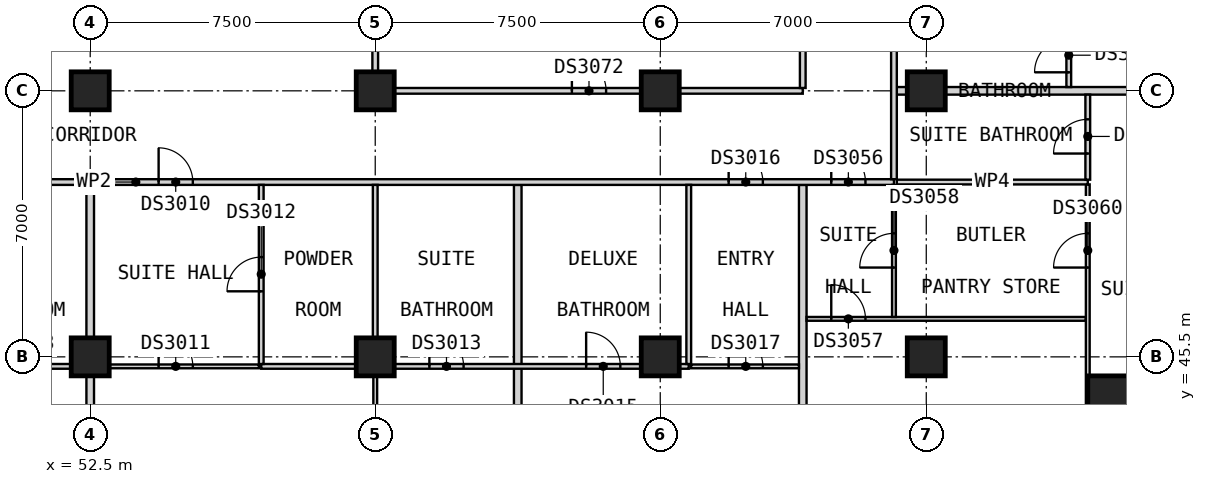
"""IFC4 building model, lengths in metres.
Left out: names, types, materials, properties, quantities, classifications, styles, units other than length and angle.
Written with IfcOpenShell. Run it as: python <this file> out.ifc"""

import sys

from ifc_helpers import new_model, si_unit, direction, frame, frame_2d, origin, origin_2d, place, context, subcontext, project, spatial, rectangle, extrude, element, fill, save


model = new_model("IFC4")
c1 = context("Model", 3, precision=1e-05, world=origin(), true_north=direction((0.0, 1.0)))
c2 = subcontext(c1, "Body", "Model", "MODEL_VIEW")
j1 = project(units=[si_unit("LENGTHUNIT", "METRE"), si_unit("PLANEANGLEUNIT", "RADIAN")], contexts=[c1])
p1 = place(None, origin())
s1 = spatial("IfcSite", under=j1, at=p1, CompositionType="ELEMENT")
p2 = place(p1, origin())
s2 = spatial("IfcBuilding", under=s1, at=p2, CompositionType="ELEMENT")
p3 = place(p2, frame((0.0, 0.0, 137.4)))
s3 = spatial("IfcBuildingStorey", under=s2, at=p3, CompositionType="ELEMENT", Elevation=137.4)
for number, where, z_axis, x_axis in (
    (1, (52.5, 45.5, 0.0), (0.0, 0.0, 1.0), (1.0, 0.0, 0.0)),
    (2, (52.5, 52.5, 0.0), (0.0, 0.0, 1.0), (1.0, 0.0, 0.0)),
    (3, (60.0, 45.5, 0.0), (0.0, 0.0, 1.0), (1.0, 0.0, 0.0)),
    (4, (60.0, 52.5, 0.0), (0.0, 0.0, 1.0), (1.0, 0.0, 0.0)),
    (5, (67.5, 45.5, 0.0), (0.0, 0.0, 1.0), (1.0, 0.0, 0.0)),
    (6, (67.5, 52.5, 0.0), (0.0, 0.0, 1.0), (1.0, 0.0, 0.0)),
    (7, (74.5, 45.5, 0.0), (0.0, 0.0, 1.0), (1.0, 0.0, 0.0)),
    (8, (74.5, 52.5, 0.0), (0.0, 0.0, 1.0), (1.0, 0.0, 0.0)),
):
    element("IfcColumn", number, at=place(p3, frame(where, z_axis=z_axis, x_axis=x_axis)), inside=s3, PredefinedType="COLUMN", context=c2, shape_type="SweptSolid", body=[
        extrude(rectangle(XDim=1.0, YDim=1.0, at=origin_2d()), origin(), (0.0, 0.0, 1.0), 3.6),
    ])
p4 = place(p3, frame((80.5, 43.25, 0.0), z_axis=(0.0, 0.0, 1.0), x_axis=(1.0, 0.0, 0.0)))
e9 = element("IfcColumn", 9, at=p4, inside=s3, PredefinedType="COLUMN", context=c2, shape_type="SweptSolid", body=[
    extrude(rectangle(XDim=3.5, YDim=3.5, at=origin_2d()), origin(), (0.0, 0.0, 1.0), 3.6),
])
for number, where, z_axis, x_axis in (
    (10, (73.725, 52.5, 0.0), (0.0, 0.0, 1.0), (1.0, 0.0, 0.0)),
    (11, (52.5, 37.5, 0.0), (0.0, 0.0, 1.0), (0.0, 1.0, 0.0)),
):
    element("IfcWall", number, at=place(p3, frame(where, z_axis=z_axis, x_axis=x_axis)), inside=s3, PredefinedType="PARTITIONING", context=c2, shape_type="SweptSolid", body=[
        extrude(rectangle(XDim=12.525, YDim=0.2, at=frame_2d((6.262, 0.0))), origin(), (0.0, 0.0, 1.0), 3.35),
    ])
for number, where, z_axis, x_axis in (
    (12, (63.75, 38.31, 0.0), (0.0, 0.0, 1.0), (0.0, 1.0, 0.0)),
    (13, (71.25, 38.31, 0.0), (0.0, 0.0, 1.0), (0.0, 1.0, 0.0)),
):
    element("IfcWall", number, at=place(p3, frame(where, z_axis=z_axis, x_axis=x_axis)), inside=s3, PredefinedType="PARTITIONING", context=c2, shape_type="SweptSolid", body=[
        extrude(rectangle(XDim=11.715, YDim=0.2, at=frame_2d((5.857, 0.0))), origin(), (0.0, 0.0, 1.0), 3.35),
    ])
p5 = place(p3, frame((33.75, 50.1, 0.0), z_axis=(0.0, 0.0, 1.0), x_axis=(1.0, 0.0, 0.0)))
e14 = element("IfcWall", 14, at=p5, inside=s3, PredefinedType="PARTITIONING", context=c2, shape_type="SweptSolid", body=[
    extrude(rectangle(XDim=39.9, YDim=0.15, at=frame_2d((19.95, 0.0))), origin(), (0.0, 0.0, 1.0), 3.35),
])
p6 = place(p5, frame((5.175, 0.0, 0.0)))
e15 = element("IfcOpeningElement", 15, at=p6, cuts=e14, PredefinedType="OPENING", context=c2, shape_type="SweptSolid", body=[
    extrude(rectangle(XDim=0.9, YDim=2.1, at=frame_2d((0.45, 1.05))), frame((0.0, 0.085, 0.0), z_axis=(0.0, -1.0, 0.0), x_axis=(1.0, 0.0, 0.0)), (0.0, 0.0, 1.0), 0.17),
])
p7 = place(p5, frame((9.3, 0.0, 0.0)))
e16 = element("IfcOpeningElement", 16, at=p7, cuts=e14, PredefinedType="OPENING", context=c2, shape_type="SweptSolid", body=[
    extrude(rectangle(XDim=0.9, YDim=2.1, at=frame_2d((0.45, 1.05))), frame((0.0, 0.085, 0.0), z_axis=(0.0, -1.0, 0.0), x_axis=(1.0, 0.0, 0.0)), (0.0, 0.0, 1.0), 0.17),
])
p8 = place(p5, frame((20.55, 0.0, 0.0)))
e17 = element("IfcOpeningElement", 17, at=p8, cuts=e14, PredefinedType="OPENING", context=c2, shape_type="SweptSolid", body=[
    extrude(rectangle(XDim=0.9, YDim=2.1, at=frame_2d((0.45, 1.05))), frame((0.0, 0.085, 0.0), z_axis=(0.0, -1.0, 0.0), x_axis=(1.0, 0.0, 0.0)), (0.0, 0.0, 1.0), 0.17),
])
p9 = place(p5, frame((35.55, 0.0, 0.0)))
e18 = element("IfcOpeningElement", 18, at=p9, cuts=e14, PredefinedType="OPENING", context=c2, shape_type="SweptSolid", body=[
    extrude(rectangle(XDim=0.9, YDim=2.1, at=frame_2d((0.45, 1.05))), frame((0.0, 0.085, 0.0), z_axis=(0.0, -1.0, 0.0), x_axis=(1.0, 0.0, 0.0)), (0.0, 0.0, 1.0), 0.17),
])
p10 = place(p5, frame((38.25, 0.0, 0.0)))
e19 = element("IfcOpeningElement", 19, at=p10, cuts=e14, PredefinedType="OPENING", context=c2, shape_type="SweptSolid", body=[
    extrude(rectangle(XDim=0.9, YDim=2.1, at=frame_2d((0.45, 1.05))), frame((0.0, 0.085, 0.0), z_axis=(0.0, -1.0, 0.0), x_axis=(1.0, 0.0, 0.0)), (0.0, 0.0, 1.0), 0.17),
])
p11 = place(p3, frame((60.0, 52.5, 0.0), z_axis=(0.0, 0.0, 1.0), x_axis=(1.0, 0.0, 0.0)))
e20 = element("IfcWall", 20, at=p11, inside=s3, PredefinedType="PARTITIONING", context=c2, shape_type="SweptSolid", body=[
    extrude(rectangle(XDim=11.25, YDim=0.15, at=frame_2d((5.625, 0.0))), origin(), (0.0, 0.0, 1.0), 3.35),
])
p12 = place(p11, frame((5.175, 0.0, 0.0)))
e21 = element("IfcOpeningElement", 21, at=p12, cuts=e20, PredefinedType="OPENING", context=c2, shape_type="SweptSolid", body=[
    extrude(rectangle(XDim=0.9, YDim=2.1, at=frame_2d((0.45, 1.05))), frame((0.0, 0.085, 0.0), z_axis=(0.0, -1.0, 0.0), x_axis=(1.0, 0.0, 0.0)), (0.0, 0.0, 1.0), 0.17),
])
p13 = place(p3, frame((71.25, 52.575, 0.0), z_axis=(0.0, 0.0, 1.0), x_axis=(0.0, 1.0, 0.0)))
e22 = element("IfcWall", 22, at=p13, inside=s3, PredefinedType="PARTITIONING", context=c2, shape_type="SweptSolid", body=[
    extrude(rectangle(XDim=11.85, YDim=0.15, at=frame_2d((5.925, 0.0))), origin(), (0.0, 0.0, 1.0), 3.35),
])
p14 = place(p13, frame((9.225, 0.0, 0.0)))
e23 = element("IfcOpeningElement", 23, at=p14, cuts=e22, PredefinedType="OPENING", context=c2, shape_type="SweptSolid", body=[
    extrude(rectangle(XDim=0.9, YDim=2.1, at=frame_2d((0.45, 1.05))), frame((0.0, 0.085, 0.0), z_axis=(0.0, -1.0, 0.0), x_axis=(1.0, 0.0, 0.0)), (0.0, 0.0, 1.0), 0.17),
])
p15 = place(p3, frame((73.65, 50.175, 0.0), z_axis=(0.0, 0.0, 1.0), x_axis=(0.0, 1.0, 0.0)))
e24 = element("IfcWall", 24, at=p15, inside=s3, PredefinedType="PARTITIONING", context=c2, shape_type="SweptSolid", body=[
    extrude(rectangle(XDim=38.4, YDim=0.15, at=frame_2d((19.2, 0.0))), origin(), (0.0, 0.0, 1.0), 3.35),
])
p16 = place(p15, frame((4.688, 0.0, 0.0)))
e25 = element("IfcOpeningElement", 25, at=p16, cuts=e24, PredefinedType="OPENING", context=c2, shape_type="SweptSolid", body=[
    extrude(rectangle(XDim=0.9, YDim=2.1, at=frame_2d((0.45, 1.05))), frame((0.0, 0.085, 0.0), z_axis=(0.0, -1.0, 0.0), x_axis=(1.0, 0.0, 0.0)), (0.0, 0.0, 1.0), 0.17),
])
p17 = place(p15, frame((11.625, 0.0, 0.0)))
e26 = element("IfcOpeningElement", 26, at=p17, cuts=e24, PredefinedType="OPENING", context=c2, shape_type="SweptSolid", body=[
    extrude(rectangle(XDim=0.9, YDim=2.1, at=frame_2d((0.45, 1.05))), frame((0.0, 0.085, 0.0), z_axis=(0.0, -1.0, 0.0), x_axis=(1.0, 0.0, 0.0)), (0.0, 0.0, 1.0), 0.17),
])
p18 = place(p15, frame((22.875, 0.0, 0.0)))
e27 = element("IfcOpeningElement", 27, at=p18, cuts=e24, PredefinedType="OPENING", context=c2, shape_type="SweptSolid", body=[
    extrude(rectangle(XDim=0.9, YDim=2.1, at=frame_2d((0.45, 1.05))), frame((0.0, 0.085, 0.0), z_axis=(0.0, -1.0, 0.0), x_axis=(1.0, 0.0, 0.0)), (0.0, 0.0, 1.0), 0.17),
])
p19 = place(p15, frame((34.688, 0.0, 0.0)))
e28 = element("IfcOpeningElement", 28, at=p19, cuts=e24, PredefinedType="OPENING", context=c2, shape_type="SweptSolid", body=[
    extrude(rectangle(XDim=0.9, YDim=2.1, at=frame_2d((0.45, 1.05))), frame((0.0, 0.085, 0.0), z_axis=(0.0, -1.0, 0.0), x_axis=(1.0, 0.0, 0.0)), (0.0, 0.0, 1.0), 0.17),
])
p20 = place(p3, frame((52.6, 45.25, 0.0), z_axis=(0.0, 0.0, 1.0), x_axis=(1.0, 0.0, 0.0)))
e29 = element("IfcWall", 29, at=p20, inside=s3, PredefinedType="PARTITIONING", context=c2, shape_type="SweptSolid", body=[
    extrude(rectangle(XDim=4.337, YDim=0.1, at=frame_2d((2.169, 0.0))), origin(), (0.0, 0.0, 1.0), 3.35),
])
p21 = place(p20, frame((1.7, 0.0, 0.0)))
e30 = element("IfcOpeningElement", 30, at=p21, cuts=e29, PredefinedType="OPENING", context=c2, shape_type="SweptSolid", body=[
    extrude(rectangle(XDim=0.9, YDim=2.1, at=frame_2d((0.45, 1.05))), frame((0.0, 0.06, 0.0), z_axis=(0.0, -1.0, 0.0), x_axis=(1.0, 0.0, 0.0)), (0.0, 0.0, 1.0), 0.12),
])
p22 = place(p3, frame((68.312, 45.25, 0.0), z_axis=(0.0, 0.0, 1.0), x_axis=(1.0, 0.0, 0.0)))
e31 = element("IfcWall", 31, at=p22, inside=s3, PredefinedType="PARTITIONING", context=c2, shape_type="SweptSolid", body=[
    extrude(rectangle(XDim=2.837, YDim=0.1, at=frame_2d((1.419, 0.0))), origin(), (0.0, 0.0, 1.0), 3.35),
])
p23 = place(p22, frame((0.988, 0.0, 0.0)))
e32 = element("IfcOpeningElement", 32, at=p23, cuts=e31, PredefinedType="OPENING", context=c2, shape_type="SweptSolid", body=[
    extrude(rectangle(XDim=0.9, YDim=2.1, at=frame_2d((0.45, 1.05))), frame((0.0, 0.06, 0.0), z_axis=(0.0, -1.0, 0.0), x_axis=(1.0, 0.0, 0.0)), (0.0, 0.0, 1.0), 0.12),
])
p24 = place(p3, frame((71.35, 46.5, 0.0), z_axis=(0.0, 0.0, 1.0), x_axis=(1.0, 0.0, 0.0)))
e33 = element("IfcWall", 33, at=p24, inside=s3, PredefinedType="PARTITIONING", context=c2, shape_type="SweptSolid", body=[
    extrude(rectangle(XDim=7.35, YDim=0.1, at=frame_2d((3.675, 0.0))), origin(), (0.0, 0.0, 1.0), 3.35),
])
p25 = place(p24, frame((0.65, 0.0, 0.0)))
e34 = element("IfcOpeningElement", 34, at=p25, cuts=e33, PredefinedType="OPENING", context=c2, shape_type="SweptSolid", body=[
    extrude(rectangle(XDim=0.9, YDim=2.1, at=frame_2d((0.45, 1.05))), frame((0.0, 0.06, 0.0), z_axis=(0.0, -1.0, 0.0), x_axis=(1.0, 0.0, 0.0)), (0.0, 0.0, 1.0), 0.12),
])
p26 = place(p3, frame((60.0, 37.5, 0.0), z_axis=(0.0, 0.0, 1.0), x_axis=(0.0, 1.0, 0.0)))
e35 = element("IfcWall", 35, at=p26, inside=s3, PredefinedType="PARTITIONING", context=c2, shape_type="SweptSolid", body=[
    extrude(rectangle(XDim=7.688, YDim=0.1, at=frame_2d((3.844, 0.0))), origin(), (0.0, 0.0, 1.0), 3.35),
])
p27 = place(p26, frame((3.425, 0.0, 0.0)))
e36 = element("IfcOpeningElement", 36, at=p27, cuts=e35, PredefinedType="OPENING", context=c2, shape_type="SweptSolid", body=[
    extrude(rectangle(XDim=0.9, YDim=2.1, at=frame_2d((0.45, 1.05))), frame((0.0, 0.06, 0.0), z_axis=(0.0, -1.0, 0.0), x_axis=(1.0, 0.0, 0.0)), (0.0, 0.0, 1.0), 0.12),
])
p28 = place(p3, frame((73.65, 46.55, 0.0), z_axis=(0.0, 0.0, 1.0), x_axis=(0.0, 1.0, 0.0)))
e37 = element("IfcWall", 37, at=p28, inside=s3, PredefinedType="PARTITIONING", context=c2, shape_type="SweptSolid", body=[
    extrude(rectangle(XDim=3.475, YDim=0.1, at=frame_2d((1.737, 0.0))), origin(), (0.0, 0.0, 1.0), 3.35),
])
p29 = place(p28, frame((1.3, 0.0, 0.0)))
e38 = element("IfcOpeningElement", 38, at=p29, cuts=e37, PredefinedType="OPENING", context=c2, shape_type="SweptSolid", body=[
    extrude(rectangle(XDim=0.9, YDim=2.1, at=frame_2d((0.45, 1.05))), frame((0.0, 0.06, 0.0), z_axis=(0.0, -1.0, 0.0), x_axis=(1.0, 0.0, 0.0)), (0.0, 0.0, 1.0), 0.12),
])
p30 = place(p3, frame((78.75, 38.31, 0.0), z_axis=(0.0, 0.0, 1.0), x_axis=(0.0, 1.0, 0.0)))
e39 = element("IfcWall", 39, at=p30, inside=s3, PredefinedType="PARTITIONING", context=c2, shape_type="SweptSolid", body=[
    extrude(rectangle(XDim=11.728, YDim=0.1, at=frame_2d((5.864, 0.0))), origin(), (0.0, 0.0, 1.0), 3.35),
])
p31 = place(p30, frame((0.99, 0.0, 0.0)))
e40 = element("IfcOpeningElement", 40, at=p31, cuts=e39, PredefinedType="OPENING", context=c2, shape_type="SweptSolid", body=[
    extrude(rectangle(XDim=0.9, YDim=2.1, at=frame_2d((0.45, 1.05))), frame((0.0, 0.06, 0.0), z_axis=(0.0, -1.0, 0.0), x_axis=(1.0, 0.0, 0.0)), (0.0, 0.0, 1.0), 0.12),
])
p32 = place(p30, frame((9.54, 0.0, 0.0)))
e41 = element("IfcOpeningElement", 41, at=p32, cuts=e39, PredefinedType="OPENING", context=c2, shape_type="SweptSolid", body=[
    extrude(rectangle(XDim=0.9, YDim=2.1, at=frame_2d((0.45, 1.05))), frame((0.0, 0.06, 0.0), z_axis=(0.0, -1.0, 0.0), x_axis=(1.0, 0.0, 0.0)), (0.0, 0.0, 1.0), 0.12),
])
p33 = place(p3, frame((45.75, 45.25, 0.0), z_axis=(0.0, 0.0, 1.0), x_axis=(1.0, 0.0, 0.0)))
e42 = element("IfcWall", 42, at=p33, inside=s3, PredefinedType="PARTITIONING", context=c2, shape_type="SweptSolid", body=[
    extrude(rectangle(XDim=6.65, YDim=0.125, at=frame_2d((3.325, 0.0))), origin(), (0.0, 0.0, 1.0), 3.35),
])
p34 = place(p33, frame((4.425, 0.0, 0.0)))
e43 = element("IfcOpeningElement", 43, at=p34, cuts=e42, PredefinedType="OPENING", context=c2, shape_type="SweptSolid", body=[
    extrude(rectangle(XDim=0.9, YDim=2.1, at=frame_2d((0.45, 1.05))), frame((0.0, 0.073, 0.0), z_axis=(0.0, -1.0, 0.0), x_axis=(1.0, 0.0, 0.0)), (0.0, 0.0, 1.0), 0.145),
])
p35 = place(p3, frame((57.0, 45.25, 0.0), z_axis=(0.0, 0.0, 1.0), x_axis=(1.0, 0.0, 0.0)))
e44 = element("IfcWall", 44, at=p35, inside=s3, PredefinedType="PARTITIONING", context=c2, shape_type="SweptSolid", body=[
    extrude(rectangle(XDim=11.25, YDim=0.125, at=frame_2d((5.625, 0.0))), origin(), (0.0, 0.0, 1.0), 3.35),
])
p36 = place(p35, frame((4.425, 0.0, 0.0)))
e45 = element("IfcOpeningElement", 45, at=p36, cuts=e44, PredefinedType="OPENING", context=c2, shape_type="SweptSolid", body=[
    extrude(rectangle(XDim=0.9, YDim=2.1, at=frame_2d((0.45, 1.05))), frame((0.0, 0.073, 0.0), z_axis=(0.0, -1.0, 0.0), x_axis=(1.0, 0.0, 0.0)), (0.0, 0.0, 1.0), 0.145),
])
p37 = place(p35, frame((8.55, 0.0, 0.0)))
e46 = element("IfcOpeningElement", 46, at=p37, cuts=e44, PredefinedType="OPENING", context=c2, shape_type="SweptSolid", body=[
    extrude(rectangle(XDim=0.9, YDim=2.1, at=frame_2d((0.45, 1.05))), frame((0.0, 0.073, 0.0), z_axis=(0.0, -1.0, 0.0), x_axis=(1.0, 0.0, 0.0)), (0.0, 0.0, 1.0), 0.145),
])
p38 = place(p3, frame((73.725, 50.1, 0.0), z_axis=(0.0, 0.0, 1.0), x_axis=(1.0, 0.0, 0.0)))
e47 = element("IfcWall", 47, at=p38, inside=s3, PredefinedType="PARTITIONING", context=c2, shape_type="SweptSolid", body=[
    extrude(rectangle(XDim=5.025, YDim=0.125, at=frame_2d((2.512, 0.0))), origin(), (0.0, 0.0, 1.0), 3.35),
])
p39 = place(p3, frame((57.0, 45.312, 0.0), z_axis=(0.0, 0.0, 1.0), x_axis=(0.0, 1.0, 0.0)))
e48 = element("IfcWall", 48, at=p39, inside=s3, PredefinedType="PARTITIONING", context=c2, shape_type="SweptSolid", body=[
    extrude(rectangle(XDim=4.712, YDim=0.125, at=frame_2d((2.356, 0.0))), origin(), (0.0, 0.0, 1.0), 3.35),
])
p40 = place(p39, frame((1.913, 0.0, 0.0)))
e49 = element("IfcOpeningElement", 49, at=p40, cuts=e48, PredefinedType="OPENING", context=c2, shape_type="SweptSolid", body=[
    extrude(rectangle(XDim=0.9, YDim=2.1, at=frame_2d((0.45, 1.05))), frame((0.0, 0.073, 0.0), z_axis=(0.0, -1.0, 0.0), x_axis=(1.0, 0.0, 0.0)), (0.0, 0.0, 1.0), 0.145),
])
for number, where, z_axis, x_axis in (
    (50, (60.0, 45.312, 0.0), (0.0, 0.0, 1.0), (0.0, 1.0, 0.0)),
    (51, (68.25, 45.312, 0.0), (0.0, 0.0, 1.0), (0.0, 1.0, 0.0)),
):
    element("IfcWall", number, at=place(p3, frame(where, z_axis=z_axis, x_axis=x_axis)), inside=s3, PredefinedType="PARTITIONING", context=c2, shape_type="SweptSolid", body=[
        extrude(rectangle(XDim=4.712, YDim=0.125, at=frame_2d((2.356, 0.0))), origin(), (0.0, 0.0, 1.0), 3.35),
    ])
p41 = place(p3, frame((78.25, 52.6, 0.0), z_axis=(0.0, 0.0, 1.0), x_axis=(0.0, 1.0, 0.0)))
e52 = element("IfcWall", 52, at=p41, inside=s3, PredefinedType="PARTITIONING", context=c2, shape_type="SweptSolid", body=[
    extrude(rectangle(XDim=1.712, YDim=0.125, at=frame_2d((0.856, 0.0))), origin(), (0.0, 0.0, 1.0), 3.35),
])
p42 = place(p41, frame((0.387, 0.0, 0.0)))
e53 = element("IfcOpeningElement", 53, at=p42, cuts=e52, PredefinedType="OPENING", context=c2, shape_type="SweptSolid", body=[
    extrude(rectangle(XDim=0.9, YDim=2.1, at=frame_2d((0.45, 1.05))), frame((0.0, 0.073, 0.0), z_axis=(0.0, -1.0, 0.0), x_axis=(1.0, 0.0, 0.0)), (0.0, 0.0, 1.0), 0.145),
])
p43 = place(p3, frame((78.75, 50.163, 0.0), z_axis=(0.0, 0.0, 1.0), x_axis=(0.0, 1.0, 0.0)))
e54 = element("IfcWall", 54, at=p43, inside=s3, PredefinedType="PARTITIONING", context=c2, shape_type="SweptSolid", body=[
    extrude(rectangle(XDim=2.237, YDim=0.125, at=frame_2d((1.119, 0.0))), origin(), (0.0, 0.0, 1.0), 3.35),
])
p44 = place(p43, frame((0.688, 0.0, 0.0)))
e55 = element("IfcOpeningElement", 55, at=p44, cuts=e54, PredefinedType="OPENING", context=c2, shape_type="SweptSolid", body=[
    extrude(rectangle(XDim=0.9, YDim=2.1, at=frame_2d((0.45, 1.05))), frame((0.0, 0.073, 0.0), z_axis=(0.0, -1.0, 0.0), x_axis=(1.0, 0.0, 0.0)), (0.0, 0.0, 1.0), 0.145),
])
p45 = place(p3, frame((60.0, 52.575, 0.0), z_axis=(0.0, 0.0, 1.0), x_axis=(0.0, 1.0, 0.0)))
e56 = element("IfcWall", 56, at=p45, inside=s3, PredefinedType="PARTITIONING", context=c2, shape_type="SweptSolid", body=[
    extrude(rectangle(XDim=7.425, YDim=0.15, at=frame_2d((3.712, 0.0))), origin(), (0.0, 0.0, 1.0), 3.35),
])
p46 = place(p8, origin())
e57 = element("IfcDoor", 57, at=p46, inside=s3, OperationType="SINGLE_SWING_RIGHT", PredefinedType="DOOR", context=c2, shape_type="SweptSolid", body=[
    extrude(rectangle(XDim=0.9, YDim=2.1, at=frame_2d((0.45, 1.05))), frame((0.0, 0.025, 0.0), z_axis=(0.0, -1.0, 0.0), x_axis=(1.0, 0.0, 0.0)), (0.0, 0.0, 1.0), 0.05),
])
fill(e17, e57)
p47 = place(p21, origin())
e58 = element("IfcDoor", 58, at=p47, inside=s3, OperationType="SINGLE_SWING_LEFT", PredefinedType="DOOR", context=c2, shape_type="SweptSolid", body=[
    extrude(rectangle(XDim=0.9, YDim=2.1, at=frame_2d((0.45, 1.05))), frame((0.0, 0.025, 0.0), z_axis=(0.0, -1.0, 0.0), x_axis=(1.0, 0.0, 0.0)), (0.0, 0.0, 1.0), 0.05),
])
fill(e30, e58)
p48 = place(p40, origin())
e59 = element("IfcDoor", 59, at=p48, inside=s3, OperationType="SINGLE_SWING_LEFT", PredefinedType="DOOR", context=c2, shape_type="SweptSolid", body=[
    extrude(rectangle(XDim=0.9, YDim=2.1, at=frame_2d((0.45, 1.05))), frame((0.0, 0.025, 0.0), z_axis=(0.0, -1.0, 0.0), x_axis=(1.0, 0.0, 0.0)), (0.0, 0.0, 1.0), 0.05),
])
fill(e49, e59)
p49 = place(p36, origin())
e60 = element("IfcDoor", 60, at=p49, inside=s3, OperationType="SINGLE_SWING_LEFT", PredefinedType="DOOR", context=c2, shape_type="SweptSolid", body=[
    extrude(rectangle(XDim=0.9, YDim=2.1, at=frame_2d((0.45, 1.05))), frame((0.0, 0.025, 0.0), z_axis=(0.0, -1.0, 0.0), x_axis=(1.0, 0.0, 0.0)), (0.0, 0.0, 1.0), 0.05),
])
fill(e45, e60)
p50 = place(p37, origin())
e61 = element("IfcDoor", 61, at=p50, inside=s3, OperationType="SINGLE_SWING_LEFT", PredefinedType="DOOR", context=c2, shape_type="SweptSolid", body=[
    extrude(rectangle(XDim=0.9, YDim=2.1, at=frame_2d((0.45, 1.05))), frame((0.0, 0.025, 0.0), z_axis=(0.0, -1.0, 0.0), x_axis=(1.0, 0.0, 0.0)), (0.0, 0.0, 1.0), 0.05),
])
fill(e46, e61)
p51 = place(p9, origin())
e62 = element("IfcDoor", 62, at=p51, inside=s3, OperationType="SINGLE_SWING_RIGHT", PredefinedType="DOOR", context=c2, shape_type="SweptSolid", body=[
    extrude(rectangle(XDim=0.9, YDim=2.1, at=frame_2d((0.45, 1.05))), frame((0.0, 0.025, 0.0), z_axis=(0.0, -1.0, 0.0), x_axis=(1.0, 0.0, 0.0)), (0.0, 0.0, 1.0), 0.05),
])
fill(e18, e62)
p52 = place(p23, origin())
e63 = element("IfcDoor", 63, at=p52, inside=s3, OperationType="SINGLE_SWING_LEFT", PredefinedType="DOOR", context=c2, shape_type="SweptSolid", body=[
    extrude(rectangle(XDim=0.9, YDim=2.1, at=frame_2d((0.45, 1.05))), frame((0.0, 0.025, 0.0), z_axis=(0.0, -1.0, 0.0), x_axis=(1.0, 0.0, 0.0)), (0.0, 0.0, 1.0), 0.05),
])
fill(e32, e63)
p53 = place(p42, origin())
e64 = element("IfcDoor", 64, at=p53, inside=s3, OperationType="SINGLE_SWING_LEFT", PredefinedType="DOOR", context=c2, shape_type="SweptSolid", body=[
    extrude(rectangle(XDim=0.9, YDim=2.1, at=frame_2d((0.45, 1.05))), frame((0.0, 0.025, 0.0), z_axis=(0.0, -1.0, 0.0), x_axis=(1.0, 0.0, 0.0)), (0.0, 0.0, 1.0), 0.05),
])
fill(e53, e64)
p54 = place(p10, origin())
e65 = element("IfcDoor", 65, at=p54, inside=s3, OperationType="SINGLE_SWING_LEFT", PredefinedType="DOOR", context=c2, shape_type="SweptSolid", body=[
    extrude(rectangle(XDim=0.9, YDim=2.1, at=frame_2d((0.45, 1.05))), frame((0.0, 0.025, 0.0), z_axis=(0.0, -1.0, 0.0), x_axis=(1.0, 0.0, 0.0)), (0.0, 0.0, 1.0), 0.05),
])
fill(e19, e65)
p55 = place(p25, origin())
e66 = element("IfcDoor", 66, at=p55, inside=s3, OperationType="SINGLE_SWING_RIGHT", PredefinedType="DOOR", context=c2, shape_type="SweptSolid", body=[
    extrude(rectangle(XDim=0.9, YDim=2.1, at=frame_2d((0.45, 1.05))), frame((0.0, 0.025, 0.0), z_axis=(0.0, -1.0, 0.0), x_axis=(1.0, 0.0, 0.0)), (0.0, 0.0, 1.0), 0.05),
])
fill(e34, e66)
p56 = place(p29, origin())
e67 = element("IfcDoor", 67, at=p56, inside=s3, OperationType="SINGLE_SWING_RIGHT", PredefinedType="DOOR", context=c2, shape_type="SweptSolid", body=[
    extrude(rectangle(XDim=0.9, YDim=2.1, at=frame_2d((0.45, 1.05))), frame((0.0, 0.025, 0.0), z_axis=(0.0, -1.0, 0.0), x_axis=(1.0, 0.0, 0.0)), (0.0, 0.0, 1.0), 0.05),
])
fill(e38, e67)
p57 = place(p32, origin())
e68 = element("IfcDoor", 68, at=p57, inside=s3, OperationType="SINGLE_SWING_RIGHT", PredefinedType="DOOR", context=c2, shape_type="SweptSolid", body=[
    extrude(rectangle(XDim=0.9, YDim=2.1, at=frame_2d((0.45, 1.05))), frame((0.0, 0.025, 0.0), z_axis=(0.0, -1.0, 0.0), x_axis=(1.0, 0.0, 0.0)), (0.0, 0.0, 1.0), 0.05),
])
fill(e41, e68)
p58 = place(p44, origin())
e69 = element("IfcDoor", 69, at=p58, inside=s3, OperationType="SINGLE_SWING_LEFT", PredefinedType="DOOR", context=c2, shape_type="SweptSolid", body=[
    extrude(rectangle(XDim=0.9, YDim=2.1, at=frame_2d((0.45, 1.05))), frame((0.0, 0.025, 0.0), z_axis=(0.0, -1.0, 0.0), x_axis=(1.0, 0.0, 0.0)), (0.0, 0.0, 1.0), 0.05),
])
fill(e55, e69)
p59 = place(p12, origin())
e70 = element("IfcDoor", 70, at=p59, inside=s3, OperationType="SINGLE_SWING_LEFT", PredefinedType="DOOR", context=c2, shape_type="SweptSolid", body=[
    extrude(rectangle(XDim=0.9, YDim=2.1, at=frame_2d((0.45, 1.05))), frame((0.0, 0.025, 0.0), z_axis=(0.0, -1.0, 0.0), x_axis=(1.0, 0.0, 0.0)), (0.0, 0.0, 1.0), 0.05),
])
fill(e21, e70)
save(model, sys.argv[1])
